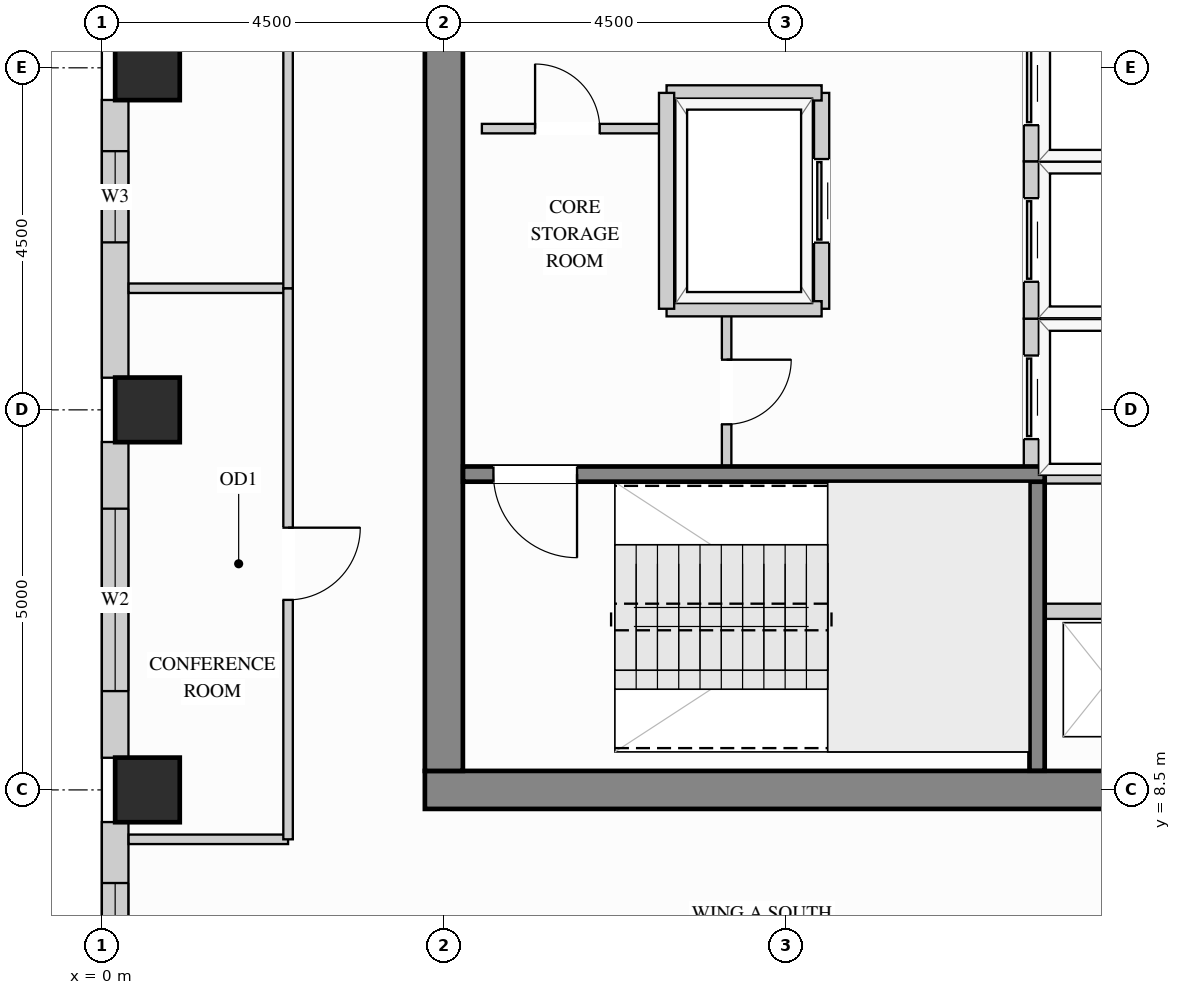
"""IFC4 building model, lengths in metres.
Left out: names, types, materials, properties, quantities, classifications, styles, units other than length and angle.
Written with IfcOpenShell. Run it as: python <this file> out.ifc"""

import sys

from ifc_helpers import new_model, si_unit, direction, frame, frame_2d, origin, origin_2d, place, context, subcontext, project, spatial, rectangle, extrude, source, transform, mapped, element, fill, save


model = new_model("IFC4")
c1 = context("Model", 3, precision=1e-05, world=origin(), true_north=direction((0.0, 1.0)))
c2 = subcontext(c1, "Body", "Model", "MODEL_VIEW")
j1 = project(units=[si_unit("LENGTHUNIT", "METRE"), si_unit("PLANEANGLEUNIT", "RADIAN")], contexts=[c1])
p1 = place(None, origin())
s1 = spatial("IfcSite", under=j1, at=p1, CompositionType="ELEMENT")
p2 = place(p1, origin())
s2 = spatial("IfcBuilding", under=s1, at=p2, CompositionType="ELEMENT")
p3 = place(p2, frame((0.0, 0.0, 237.6)))
s3 = spatial("IfcBuildingStorey", under=s2, at=p3, CompositionType="ELEMENT", Elevation=237.6)
m1 = source(origin(), c2, "Body", "SweptSolid", [
    extrude(rectangle(XDim=0.85, YDim=0.85, at=origin_2d()), origin(), (0.0, 0.0, 1.0), 3.4),
])
for number, where, z_axis, x_axis in (
    (1, (0.6, 13.5, 0.0), (0.0, 0.0, 1.0), (1.0, 0.0, 0.0)),
    (2, (0.6, 18.0, 0.0), (0.0, 0.0, 1.0), (1.0, 0.0, 0.0)),
    (3, (0.6, 8.5, 0.0), (0.0, 0.0, 1.0), (1.0, 0.0, 0.0)),
):
    element("IfcColumn", number, at=place(p3, frame(where, z_axis=z_axis, x_axis=x_axis)), inside=s3, PredefinedType="COLUMN", context=c2, shape_type="MappedRepresentation", body=[
        mapped(m1, transform((0.0, 0.0, 0.0), x_axis=(1.0, 0.0, 0.0), y_axis=(0.0, 1.0, 0.0), z_axis=(0.0, 0.0, 1.0))),
    ])
m2 = source(origin(), c2, "Body", "SweptSolid", [
    extrude(rectangle(XDim=10.5, YDim=0.5, at=frame_2d((5.25, 0.0))), origin(), (0.0, 0.0, 1.0), 3.4),
])
p4 = place(p3, frame((4.25, 8.5, 0.0), z_axis=(0.0, 0.0, 1.0), x_axis=(1.0, 0.0, 0.0)))
e4 = element("IfcWall", 4, at=p4, inside=s3, PredefinedType="SHEAR", context=c2, shape_type="MappedRepresentation", body=[
    mapped(m2, transform((0.0, 0.0, 0.0), x_axis=(1.0, 0.0, 0.0), y_axis=(0.0, 1.0, 0.0), z_axis=(0.0, 0.0, 1.0))),
])
m3 = source(origin(), c2, "Body", "SweptSolid", [
    extrude(rectangle(XDim=20.5, YDim=0.5, at=frame_2d((10.25, 0.0))), origin(), (0.0, 0.0, 1.0), 3.4),
])
p5 = place(p3, frame((4.5, 8.75, 0.0), z_axis=(0.0, 0.0, 1.0), x_axis=(0.0, 1.0, 0.0)))
e5 = element("IfcWall", 5, at=p5, inside=s3, PredefinedType="SHEAR", context=c2, shape_type="MappedRepresentation", body=[
    mapped(m3, transform((0.0, 0.0, 0.0), x_axis=(1.0, 0.0, 0.0), y_axis=(0.0, 1.0, 0.0), z_axis=(0.0, 0.0, 1.0))),
])
p6 = place(p3, frame((0.175, 17.577, 0.0), z_axis=(0.0, 0.0, 1.0), x_axis=(0.0, -1.0, 0.0)))
e6 = element("IfcWall", 6, at=p6, inside=s3, PredefinedType="SOLIDWALL", context=c2, shape_type="SweptSolid", body=[
    extrude(rectangle(XDim=3.654, YDim=0.35, at=frame_2d((1.827, 0.0))), origin(), (0.0, 0.0, 1.0), 3.385),
])
p7 = place(p6, frame((0.674, 0.0, 0.78)))
e7 = element("IfcOpeningElement", 7, at=p7, cuts=e6, PredefinedType="OPENING", context=c2, shape_type="SweptSolid", body=[
    extrude(rectangle(XDim=1.2, YDim=2.1, at=frame_2d((0.6, 1.05))), frame((0.0, 0.185, 0.0), z_axis=(0.0, -1.0, 0.0), x_axis=(1.0, 0.0, 0.0)), (0.0, 0.0, 1.0), 0.37),
])
p8 = place(p3, frame((0.175, 13.077, 0.0), z_axis=(0.0, 0.0, 1.0), x_axis=(0.0, -1.0, 0.0)))
e8 = element("IfcWall", 8, at=p8, inside=s3, PredefinedType="SOLIDWALL", context=c2, shape_type="SweptSolid", body=[
    extrude(rectangle(XDim=4.154, YDim=0.35, at=frame_2d((2.077, 0.0))), origin(), (0.0, 0.0, 1.0), 3.385),
])
p9 = place(p8, frame((0.877, 0.0, 0.78)))
e9 = element("IfcOpeningElement", 9, at=p9, cuts=e8, PredefinedType="OPENING", context=c2, shape_type="SweptSolid", body=[
    extrude(rectangle(XDim=2.4, YDim=2.1, at=frame_2d((1.2, 1.05))), frame((0.0, 0.185, 0.0), z_axis=(0.0, -1.0, 0.0), x_axis=(1.0, 0.0, 0.0)), (0.0, 0.0, 1.0), 0.37),
])
p10 = place(p3, frame((0.175, 8.077, 0.0), z_axis=(0.0, 0.0, 1.0), x_axis=(0.0, -1.0, 0.0)))
e10 = element("IfcWall", 10, at=p10, inside=s3, PredefinedType="SOLIDWALL", context=c2, shape_type="SweptSolid", body=[
    extrude(rectangle(XDim=4.154, YDim=0.35, at=frame_2d((2.077, 0.0))), origin(), (0.0, 0.0, 1.0), 3.385),
])
p11 = place(p10, frame((0.802, 0.0, 0.78)))
e11 = element("IfcOpeningElement", 11, at=p11, cuts=e10, PredefinedType="OPENING", context=c2, shape_type="SweptSolid", body=[
    extrude(rectangle(XDim=1.2, YDim=2.1, at=frame_2d((0.6, 1.05))), frame((0.0, 0.185, 0.0), z_axis=(0.0, -1.0, 0.0), x_axis=(1.0, 0.0, 0.0)), (0.0, 0.0, 1.0), 0.37),
])
p12 = place(p3, frame((8.22, 12.75, 0.0), z_axis=(0.0, 0.0, 1.0), x_axis=(0.0, 1.0, 0.0)))
e12 = element("IfcWall", 12, at=p12, inside=s3, PredefinedType="PARTITIONING", context=c2, shape_type="SweptSolid", body=[
    extrude(rectangle(XDim=2.07, YDim=0.125, at=frame_2d((1.035, 0.0))), origin(), (0.0, 0.0, 1.0), 3.385),
])
p13 = place(p12, frame((0.56, 0.0, 0.0)))
e13 = element("IfcOpeningElement", 13, at=p13, cuts=e12, PredefinedType="OPENING", context=c2, shape_type="SweptSolid", body=[
    extrude(rectangle(XDim=0.85, YDim=2.1, at=frame_2d((0.425, 1.05))), frame((0.0, 0.073, 0.0), z_axis=(0.0, -1.0, 0.0), x_axis=(1.0, 0.0, 0.0)), (0.0, 0.0, 1.0), 0.145),
])
p14 = place(p3, frame((5.0, 17.2, 0.0), z_axis=(0.0, 0.0, 1.0), x_axis=(1.0, 0.0, 0.0)))
e14 = element("IfcWall", 14, at=p14, inside=s3, PredefinedType="PARTITIONING", context=c2, shape_type="SweptSolid", body=[
    extrude(rectangle(XDim=2.4, YDim=0.125, at=frame_2d((1.2, 0.0))), origin(), (0.0, 0.0, 1.0), 3.385),
])
p15 = place(p14, frame((0.7, 0.0, 0.0)))
e15 = element("IfcOpeningElement", 15, at=p15, cuts=e14, PredefinedType="OPENING", context=c2, shape_type="SweptSolid", body=[
    extrude(rectangle(XDim=0.85, YDim=2.1, at=frame_2d((0.425, 1.05))), frame((0.0, 0.073, 0.0), z_axis=(0.0, -1.0, 0.0), x_axis=(1.0, 0.0, 0.0)), (0.0, 0.0, 1.0), 0.145),
])
m4 = source(origin(), c2, "Body", "SweptSolid", [
    extrude(rectangle(XDim=2.098, YDim=0.125, at=frame_2d((1.049, 0.0))), origin(), (0.0, 0.0, 1.0), 3.385),
])
for number, where, z_axis, x_axis in (
    (16, (0.352, 7.85, 0.0), (0.0, 0.0, 1.0), (1.0, 0.0, 0.0)),
    (17, (0.352, 15.1, 0.0), (0.0, 0.0, 1.0), (1.0, 0.0, 0.0)),
):
    element("IfcWall", number, at=place(p3, frame(where, z_axis=z_axis, x_axis=x_axis)), inside=s3, PredefinedType="PARTITIONING", context=c2, shape_type="MappedRepresentation", body=[
        mapped(m4, transform((0.0, 0.0, 0.0), x_axis=(1.0, 0.0, 0.0), y_axis=(0.0, 1.0, 0.0), z_axis=(0.0, 0.0, 1.0))),
    ])
p16 = place(p3, frame((2.45, 7.85, 0.0), z_axis=(0.0, 0.0, 1.0), x_axis=(0.0, 1.0, 0.0)))
e18 = element("IfcWall", 18, at=p16, inside=s3, PredefinedType="PARTITIONING", context=c2, shape_type="SweptSolid", body=[
    extrude(rectangle(XDim=7.25, YDim=0.125, at=frame_2d((3.625, 0.0))), origin(), (0.0, 0.0, 1.0), 3.385),
])
p17 = place(p16, frame((3.15, 0.0, 0.0)))
e19 = element("IfcOpeningElement", 19, at=p17, cuts=e18, PredefinedType="OPENING", context=c2, shape_type="SweptSolid", body=[
    extrude(rectangle(XDim=0.95, YDim=2.15, at=frame_2d((0.475, 1.075))), frame((0.0, 0.073, 0.0), z_axis=(0.0, -1.0, 0.0), x_axis=(1.0, 0.0, 0.0)), (0.0, 0.0, 1.0), 0.145),
])
p18 = place(p3, frame((2.45, 15.1, 0.0), z_axis=(0.0, 0.0, 1.0), x_axis=(0.0, 1.0, 0.0)))
e20 = element("IfcWall", 20, at=p18, inside=s3, PredefinedType="PARTITIONING", context=c2, shape_type="SweptSolid", body=[
    extrude(rectangle(XDim=7.5, YDim=0.125, at=frame_2d((3.75, 0.0))), origin(), (0.0, 0.0, 1.0), 3.385),
])
p19 = place(p18, frame((3.275, 0.0, 0.0)))
e21 = element("IfcOpeningElement", 21, at=p19, cuts=e20, PredefinedType="OPENING", context=c2, shape_type="SweptSolid", body=[
    extrude(rectangle(XDim=0.95, YDim=2.15, at=frame_2d((0.475, 1.075))), frame((0.0, 0.073, 0.0), z_axis=(0.0, -1.0, 0.0), x_axis=(1.0, 0.0, 0.0)), (0.0, 0.0, 1.0), 0.145),
])
m5 = source(origin(), c2, "Body", "SweptSolid", [
    extrude(rectangle(XDim=1.63, YDim=0.2, at=frame_2d((0.815, 0.0))), origin(), (0.0, 0.0, 1.0), 3.385),
])
p20 = place(p3, frame((12.42, 10.85, 0.0), z_axis=(0.0, 0.0, 1.0), x_axis=(1.0, 0.0, 0.0)))
e22 = element("IfcWall", 22, at=p20, inside=s3, PredefinedType="PARTITIONING", context=c2, shape_type="MappedRepresentation", body=[
    mapped(m5, transform((0.0, 0.0, 0.0), x_axis=(1.0, 0.0, 0.0), y_axis=(0.0, 1.0, 0.0), z_axis=(0.0, 0.0, 1.0))),
])
m6 = source(origin(), c2, "Body", "SweptSolid", [
    extrude(rectangle(XDim=1.99, YDim=0.2, at=frame_2d((0.995, 0.0))), origin(), (0.0, 0.0, 1.0), 3.385),
])
for number, where, z_axis, x_axis in (
    (23, (12.23, 14.7, 0.0), (0.0, 0.0, 1.0), (1.0, 0.0, 0.0)),
    (24, (12.23, 12.63, 0.0), (0.0, 0.0, 1.0), (1.0, 0.0, 0.0)),
):
    element("IfcWall", number, at=place(p3, frame(where, z_axis=z_axis, x_axis=x_axis)), inside=s3, PredefinedType="PARTITIONING", context=c2, shape_type="MappedRepresentation", body=[
        mapped(m6, transform((0.0, 0.0, 0.0), x_axis=(1.0, 0.0, 0.0), y_axis=(0.0, 1.0, 0.0), z_axis=(0.0, 0.0, 1.0))),
    ])
p21 = place(p3, frame((12.23, 12.63, 0.0), z_axis=(0.0, 0.0, 1.0), x_axis=(0.0, 1.0, 0.0)))
e25 = element("IfcWall", 25, at=p21, inside=s3, PredefinedType="PARTITIONING", context=c2, shape_type="SweptSolid", body=[
    extrude(rectangle(XDim=2.07, YDim=0.2, at=frame_2d((1.035, 0.0))), origin(), (0.0, 0.0, 1.0), 3.385),
])
p22 = place(p21, frame((0.485, 0.0, 0.0)))
e26 = element("IfcOpeningElement", 26, at=p22, cuts=e25, PredefinedType="OPENING", context=c2, shape_type="SweptSolid", body=[
    extrude(rectangle(XDim=1.1, YDim=2.2, at=frame_2d((0.55, 1.1))), frame((0.0, 0.11, 0.0), z_axis=(0.0, -1.0, 0.0), x_axis=(1.0, 0.0, 0.0)), (0.0, 0.0, 1.0), 0.22),
])
p23 = place(p3, frame((12.23, 16.77, 0.0), z_axis=(0.0, 0.0, 1.0), x_axis=(1.0, 0.0, 0.0)))
e27 = element("IfcWall", 27, at=p23, inside=s3, PredefinedType="PARTITIONING", context=c2, shape_type="MappedRepresentation", body=[
    mapped(m6, transform((0.0, 0.0, 0.0), x_axis=(1.0, 0.0, 0.0), y_axis=(0.0, 1.0, 0.0), z_axis=(0.0, 0.0, 1.0))),
])
p24 = place(p3, frame((12.23, 14.7, 0.0), z_axis=(0.0, 0.0, 1.0), x_axis=(0.0, 1.0, 0.0)))
e28 = element("IfcWall", 28, at=p24, inside=s3, PredefinedType="PARTITIONING", context=c2, shape_type="SweptSolid", body=[
    extrude(rectangle(XDim=2.07, YDim=0.2, at=frame_2d((1.035, 0.0))), origin(), (0.0, 0.0, 1.0), 3.385),
])
p25 = place(p24, frame((0.485, 0.0, 0.0)))
e29 = element("IfcOpeningElement", 29, at=p25, cuts=e28, PredefinedType="OPENING", context=c2, shape_type="SweptSolid", body=[
    extrude(rectangle(XDim=1.1, YDim=2.2, at=frame_2d((0.55, 1.1))), frame((0.0, 0.11, 0.0), z_axis=(0.0, -1.0, 0.0), x_axis=(1.0, 0.0, 0.0)), (0.0, 0.0, 1.0), 0.22),
])
p26 = place(p3, frame((12.23, 16.77, 0.0), z_axis=(0.0, 0.0, 1.0), x_axis=(0.0, 1.0, 0.0)))
e30 = element("IfcWall", 30, at=p26, inside=s3, PredefinedType="PARTITIONING", context=c2, shape_type="SweptSolid", body=[
    extrude(rectangle(XDim=2.05, YDim=0.2, at=frame_2d((1.025, 0.0))), origin(), (0.0, 0.0, 1.0), 3.385),
])
p27 = place(p26, frame((0.475, 0.0, 0.0)))
e31 = element("IfcOpeningElement", 31, at=p27, cuts=e30, PredefinedType="OPENING", context=c2, shape_type="SweptSolid", body=[
    extrude(rectangle(XDim=1.1, YDim=2.2, at=frame_2d((0.55, 1.1))), frame((0.0, 0.11, 0.0), z_axis=(0.0, -1.0, 0.0), x_axis=(1.0, 0.0, 0.0)), (0.0, 0.0, 1.0), 0.22),
])
p28 = place(p3, frame((9.47, 14.83, 0.0), z_axis=(0.0, 0.0, 1.0), x_axis=(0.0, 1.0, 0.0)))
e32 = element("IfcWall", 32, at=p28, inside=s3, PredefinedType="PARTITIONING", context=c2, shape_type="SweptSolid", body=[
    extrude(rectangle(XDim=2.84, YDim=0.2, at=frame_2d((1.42, 0.0))), origin(), (0.0, 0.0, 1.0), 3.385),
])
p29 = place(p28, frame((0.87, 0.0, 0.0)))
e33 = element("IfcOpeningElement", 33, at=p29, cuts=e32, PredefinedType="OPENING", context=c2, shape_type="SweptSolid", body=[
    extrude(rectangle(XDim=1.1, YDim=2.2, at=frame_2d((0.55, 1.1))), frame((0.0, 0.11, 0.0), z_axis=(0.0, -1.0, 0.0), x_axis=(1.0, 0.0, 0.0)), (0.0, 0.0, 1.0), 0.22),
])
m7 = source(origin(), c2, "Body", "SweptSolid", [
    extrude(rectangle(XDim=2.04, YDim=0.2, at=frame_2d((1.02, 0.0))), origin(), (0.0, 0.0, 1.0), 3.385),
])
for number, where, z_axis, x_axis in (
    (34, (7.43, 17.67, 0.0), (0.0, 0.0, 1.0), (1.0, 0.0, 0.0)),
    (35, (7.43, 14.83, 0.0), (0.0, 0.0, 1.0), (1.0, 0.0, 0.0)),
):
    element("IfcWall", number, at=place(p3, frame(where, z_axis=z_axis, x_axis=x_axis)), inside=s3, PredefinedType="PARTITIONING", context=c2, shape_type="MappedRepresentation", body=[
        mapped(m7, transform((0.0, 0.0, 0.0), x_axis=(1.0, 0.0, 0.0), y_axis=(0.0, 1.0, 0.0), z_axis=(0.0, 0.0, 1.0))),
    ])
m8 = source(origin(), c2, "Body", "SweptSolid", [
    extrude(rectangle(XDim=2.84, YDim=0.2, at=frame_2d((1.42, 0.0))), origin(), (0.0, 0.0, 1.0), 3.385),
])
p30 = place(p3, frame((7.43, 14.83, 0.0), z_axis=(0.0, 0.0, 1.0), x_axis=(0.0, 1.0, 0.0)))
e36 = element("IfcWall", 36, at=p30, inside=s3, PredefinedType="PARTITIONING", context=c2, shape_type="MappedRepresentation", body=[
    mapped(m8, transform((0.0, 0.0, 0.0), x_axis=(1.0, 0.0, 0.0), y_axis=(0.0, 1.0, 0.0), z_axis=(0.0, 0.0, 1.0))),
])
m9 = source(origin(), c2, "Body", "SweptSolid", [
    extrude(rectangle(XDim=3.803, YDim=0.2, at=frame_2d((1.901, 0.0))), origin(), (0.0, 0.0, 1.0), 3.4),
])
p31 = place(p3, frame((12.305, 8.752, 0.0), z_axis=(0.0, 0.0, 1.0), x_axis=(0.0, 1.0, 0.0)))
e37 = element("IfcWall", 37, at=p31, inside=s3, PredefinedType="SHEAR", context=c2, shape_type="MappedRepresentation", body=[
    mapped(m9, transform((0.0, 0.0, 0.0), x_axis=(1.0, 0.0, 0.0), y_axis=(0.0, 1.0, 0.0), z_axis=(0.0, 0.0, 1.0))),
])
p32 = place(p3, frame((4.752, 12.655, 0.0), z_axis=(0.0, 0.0, 1.0), x_axis=(1.0, 0.0, 0.0)))
e38 = element("IfcWall", 38, at=p32, inside=s3, PredefinedType="SHEAR", context=c2, shape_type="SweptSolid", body=[
    extrude(rectangle(XDim=7.653, YDim=0.2, at=frame_2d((3.827, 0.0))), origin(), (0.0, 0.0, 1.0), 3.4),
])
p33 = place(p32, frame((0.4, 0.0, 0.0)))
e39 = element("IfcOpeningElement", 39, at=p33, cuts=e38, PredefinedType="OPENING", context=c2, shape_type="SweptSolid", body=[
    extrude(rectangle(XDim=1.1, YDim=2.15, at=frame_2d((0.55, 1.075))), frame((0.0, 0.11, 0.0), z_axis=(0.0, -1.0, 0.0), x_axis=(1.0, 0.0, 0.0)), (0.0, 0.0, 1.0), 0.22),
])
m10 = source(origin(), c2, "Body", "SweptSolid", [
    extrude(rectangle(XDim=1.1, YDim=2.2, at=frame_2d((0.55, 1.1))), frame((0.0, 0.025, 0.0), z_axis=(0.0, -1.0, 0.0), x_axis=(1.0, 0.0, 0.0)), (0.0, 0.0, 1.0), 0.05),
])
p34 = place(p22, origin())
e40 = element("IfcDoor", 40, at=p34, inside=s3, OperationType="SLIDING_TO_LEFT", PredefinedType="DOOR", context=c2, shape_type="MappedRepresentation", body=[
    mapped(m10, transform((0.0, 0.0, 0.0), x_axis=(1.0, 0.0, 0.0), y_axis=(0.0, 1.0, 0.0), z_axis=(0.0, 0.0, 1.0))),
])
fill(e26, e40)
p35 = place(p25, origin())
e41 = element("IfcDoor", 41, at=p35, inside=s3, OperationType="SLIDING_TO_LEFT", PredefinedType="DOOR", context=c2, shape_type="MappedRepresentation", body=[
    mapped(m10, transform((0.0, 0.0, 0.0), x_axis=(1.0, 0.0, 0.0), y_axis=(0.0, 1.0, 0.0), z_axis=(0.0, 0.0, 1.0))),
])
fill(e29, e41)
p36 = place(p27, origin())
e42 = element("IfcDoor", 42, at=p36, inside=s3, OperationType="SLIDING_TO_LEFT", PredefinedType="DOOR", context=c2, shape_type="MappedRepresentation", body=[
    mapped(m10, transform((0.0, 0.0, 0.0), x_axis=(1.0, 0.0, 0.0), y_axis=(0.0, 1.0, 0.0), z_axis=(0.0, 0.0, 1.0))),
])
fill(e31, e42)
p37 = place(p29, origin())
e43 = element("IfcDoor", 43, at=p37, inside=s3, OperationType="SLIDING_TO_LEFT", PredefinedType="DOOR", context=c2, shape_type="MappedRepresentation", body=[
    mapped(m10, transform((0.0, 0.0, 0.0), x_axis=(1.0, 0.0, 0.0), y_axis=(0.0, 1.0, 0.0), z_axis=(0.0, 0.0, 1.0))),
])
fill(e33, e43)
m11 = source(origin(), c2, "Body", "SweptSolid", [
    extrude(rectangle(XDim=0.95, YDim=2.15, at=frame_2d((0.475, 1.075))), frame((0.0, 0.025, 0.0), z_axis=(0.0, -1.0, 0.0), x_axis=(1.0, 0.0, 0.0)), (0.0, 0.0, 1.0), 0.05),
])
p38 = place(p17, origin())
e44 = element("IfcDoor", 44, at=p38, inside=s3, OperationType="SINGLE_SWING_RIGHT", PredefinedType="DOOR", context=c2, shape_type="MappedRepresentation", body=[
    mapped(m11, transform((0.0, 0.0, 0.0), x_axis=(1.0, 0.0, 0.0), y_axis=(0.0, 1.0, 0.0), z_axis=(0.0, 0.0, 1.0))),
])
fill(e19, e44)
m12 = source(origin(), c2, "Body", "SweptSolid", [
    extrude(rectangle(XDim=0.85, YDim=2.1, at=frame_2d((0.425, 1.05))), frame((0.0, 0.025, 0.0), z_axis=(0.0, -1.0, 0.0), x_axis=(1.0, 0.0, 0.0)), (0.0, 0.0, 1.0), 0.05),
])
p39 = place(p15, origin())
e45 = element("IfcDoor", 45, at=p39, inside=s3, OperationType="SINGLE_SWING_LEFT", PredefinedType="DOOR", context=c2, shape_type="MappedRepresentation", body=[
    mapped(m12, transform((0.0, 0.0, 0.0), x_axis=(1.0, 0.0, 0.0), y_axis=(0.0, 1.0, 0.0), z_axis=(0.0, 0.0, 1.0))),
])
fill(e15, e45)
p40 = place(p13, origin())
e46 = element("IfcDoor", 46, at=p40, inside=s3, OperationType="SINGLE_SWING_RIGHT", PredefinedType="DOOR", context=c2, shape_type="MappedRepresentation", body=[
    mapped(m12, transform((0.0, 0.0, 0.0), x_axis=(1.0, 0.0, 0.0), y_axis=(0.0, 1.0, 0.0), z_axis=(0.0, 0.0, 1.0))),
])
fill(e13, e46)
m13 = source(origin(), c2, "Body", "SweptSolid", [
    extrude(rectangle(XDim=1.1, YDim=2.15, at=frame_2d((0.55, 1.075))), frame((0.0, 0.025, 0.0), z_axis=(0.0, -1.0, 0.0), x_axis=(1.0, 0.0, 0.0)), (0.0, 0.0, 1.0), 0.05),
])
p41 = place(p33, origin())
e47 = element("IfcDoor", 47, at=p41, inside=s3, OperationType="SINGLE_SWING_RIGHT", PredefinedType="DOOR", context=c2, shape_type="MappedRepresentation", body=[
    mapped(m13, transform((0.0, 0.0, 0.0), x_axis=(1.0, 0.0, 0.0), y_axis=(0.0, 1.0, 0.0), z_axis=(0.0, 0.0, 1.0))),
])
fill(e39, e47)
m14 = source(origin(), c2, "Body", "SweptSolid", [
    extrude(rectangle(XDim=2.4, YDim=2.1, at=frame_2d((1.2, 1.05))), frame((0.0, 0.03, 0.0), z_axis=(0.0, -1.0, 0.0), x_axis=(1.0, 0.0, 0.0)), (0.0, 0.0, 1.0), 0.06),
])
p42 = place(p9, origin())
e48 = element("IfcWindow", 48, at=p42, inside=s3, PartitioningType="SINGLE_PANEL", PredefinedType="WINDOW", context=c2, shape_type="MappedRepresentation", body=[
    mapped(m14, transform((0.0, 0.0, 0.0), x_axis=(1.0, 0.0, 0.0), y_axis=(0.0, 1.0, 0.0), z_axis=(0.0, 0.0, 1.0))),
])
fill(e9, e48)
m15 = source(origin(), c2, "Body", "SweptSolid", [
    extrude(rectangle(XDim=1.2, YDim=2.1, at=frame_2d((0.6, 1.05))), frame((0.0, 0.03, 0.0), z_axis=(0.0, -1.0, 0.0), x_axis=(1.0, 0.0, 0.0)), (0.0, 0.0, 1.0), 0.06),
])
p43 = place(p7, origin())
e49 = element("IfcWindow", 49, at=p43, inside=s3, PartitioningType="SINGLE_PANEL", PredefinedType="WINDOW", context=c2, shape_type="MappedRepresentation", body=[
    mapped(m15, transform((0.0, 0.0, 0.0), x_axis=(1.0, 0.0, 0.0), y_axis=(0.0, 1.0, 0.0), z_axis=(0.0, 0.0, 1.0))),
])
fill(e7, e49)
p44 = place(p11, origin())
e50 = element("IfcWindow", 50, at=p44, inside=s3, PartitioningType="SINGLE_PANEL", PredefinedType="WINDOW", context=c2, shape_type="MappedRepresentation", body=[
    mapped(m15, transform((0.0, 0.0, 0.0), x_axis=(1.0, 0.0, 0.0), y_axis=(0.0, 1.0, 0.0), z_axis=(0.0, 0.0, 1.0))),
])
fill(e11, e50)
save(model, sys.argv[1])
